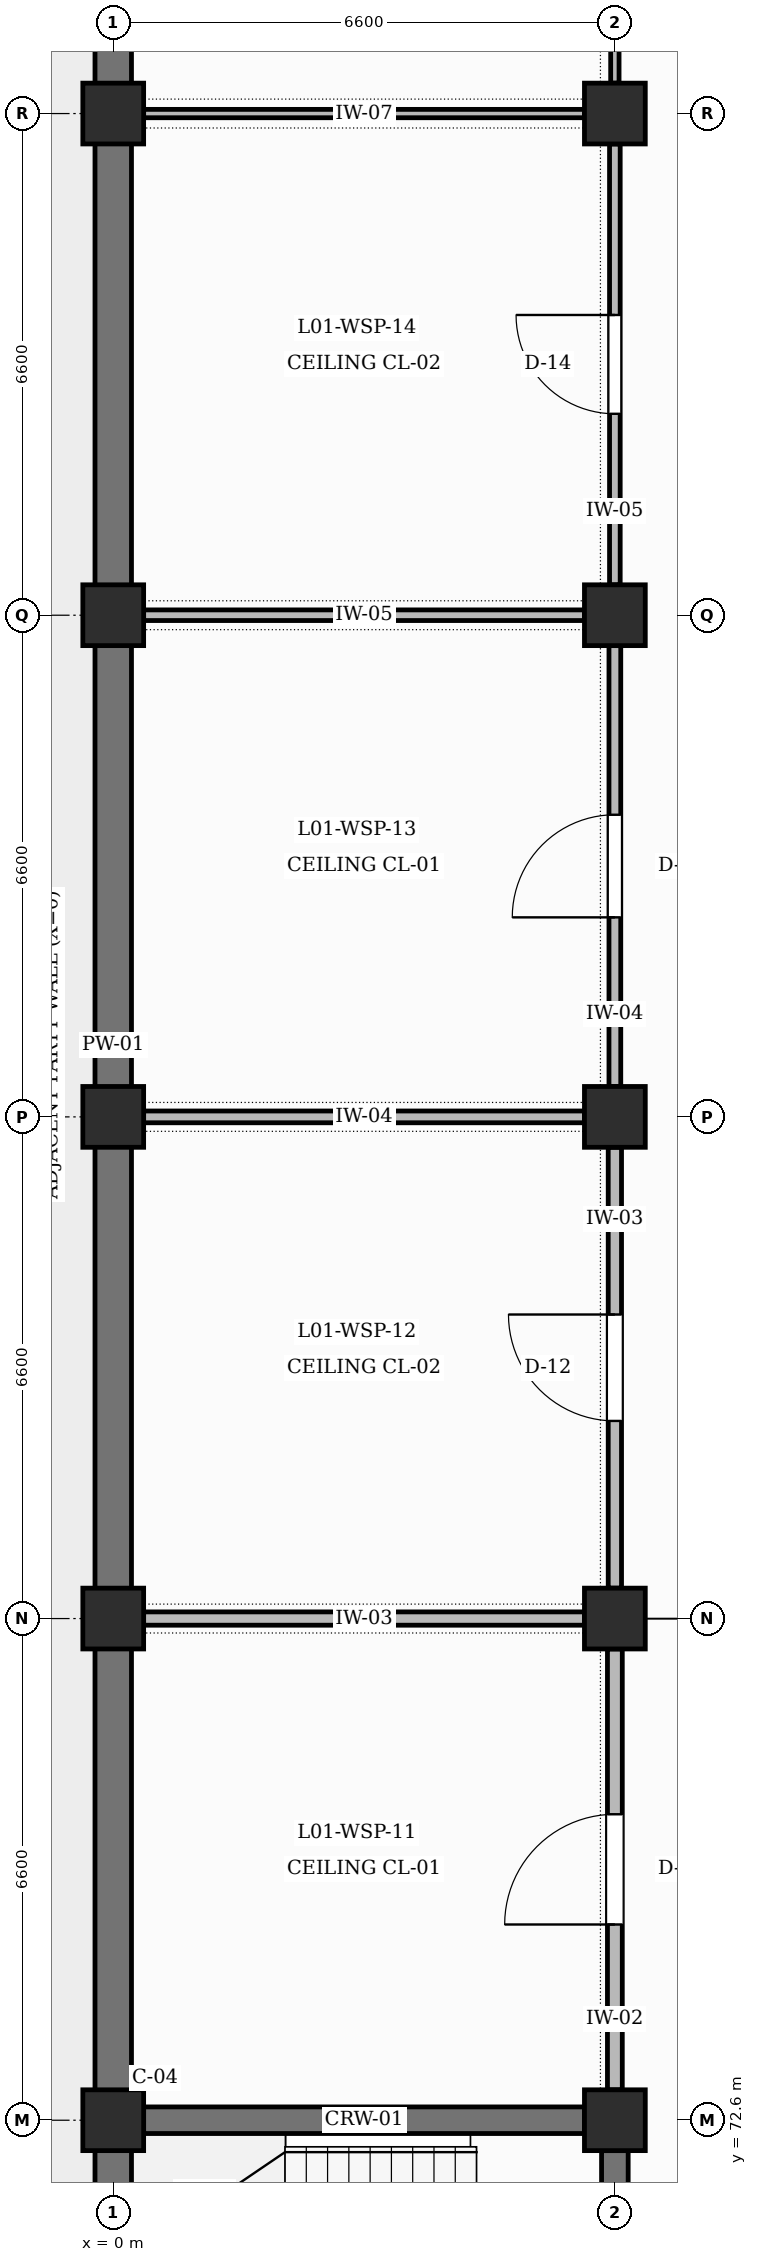
"""IFC4 building model, lengths in metres.
Left out: names, types, materials, properties, quantities, classifications, styles, units other than length and angle.
Written with IfcOpenShell. Run it as: python <this file> out.ifc"""

import sys

from ifc_helpers import new_model, si_unit, direction, frame, frame_2d, origin, origin_2d, place, context, subcontext, project, spatial, rectangle, extrude, element, fill, save


model = new_model("IFC4")
c1 = context("Model", 3, precision=1e-05, world=origin(), true_north=direction((0.0, 1.0)))
c2 = subcontext(c1, "Body", "Model", "MODEL_VIEW")
j1 = project(units=[si_unit("LENGTHUNIT", "METRE"), si_unit("PLANEANGLEUNIT", "RADIAN")], contexts=[c1])
p1 = place(None, origin())
s1 = spatial("IfcSite", under=j1, at=p1, CompositionType="ELEMENT")
p2 = place(p1, origin())
s2 = spatial("IfcBuilding", under=s1, at=p2, CompositionType="ELEMENT")
p3 = place(p2, frame((0.0, 0.0, 5.4)))
s3 = spatial("IfcBuildingStorey", under=s2, at=p3, CompositionType="ELEMENT", Elevation=5.4)
for number, where, z_axis, x_axis in (
    (1, (0.0, 72.6, 0.0), (0.0, 0.0, 1.0), (1.0, 0.0, 0.0)),
    (2, (0.0, 79.2, 0.0), (0.0, 0.0, 1.0), (1.0, 0.0, 0.0)),
    (3, (0.0, 85.8, 0.0), (0.0, 0.0, 1.0), (1.0, 0.0, 0.0)),
    (4, (0.0, 92.4, 0.0), (0.0, 0.0, 1.0), (1.0, 0.0, 0.0)),
    (5, (0.0, 99.0, 0.0), (0.0, 0.0, 1.0), (1.0, 0.0, 0.0)),
    (6, (6.6, 72.6, 0.0), (0.0, 0.0, 1.0), (1.0, 0.0, 0.0)),
    (7, (6.6, 79.2, 0.0), (0.0, 0.0, 1.0), (1.0, 0.0, 0.0)),
    (8, (6.6, 85.8, 0.0), (0.0, 0.0, 1.0), (1.0, 0.0, 0.0)),
    (9, (6.6, 92.4, 0.0), (0.0, 0.0, 1.0), (1.0, 0.0, 0.0)),
    (10, (6.6, 99.0, 0.0), (0.0, 0.0, 1.0), (1.0, 0.0, 0.0)),
):
    element("IfcColumn", number, at=place(p3, frame(where, z_axis=z_axis, x_axis=x_axis)), inside=s3, PredefinedType="COLUMN", context=c2, shape_type="SweptSolid", body=[
        extrude(rectangle(XDim=0.8, YDim=0.8, at=origin_2d()), origin(), (0.0, 0.0, 1.0), 4.8),
    ])
for number, where, z_axis, x_axis in (
    (11, (0.0, 66.4, 0.0), (0.0, 0.0, 1.0), (0.0, 1.0, 0.0)),
    (12, (0.0, 73.0, 0.0), (0.0, 0.0, 1.0), (0.0, 1.0, 0.0)),
):
    element("IfcWall", number, at=place(p3, frame(where, z_axis=z_axis, x_axis=x_axis)), inside=s3, PredefinedType="SOLIDWALL", context=c2, shape_type="SweptSolid", body=[
        extrude(rectangle(XDim=5.8, YDim=0.48, at=frame_2d((2.9, 0.0))), origin(), (0.0, 0.0, 1.0), 3.85),
    ])
p4 = place(p3, frame((0.0, 79.6, 0.0), z_axis=(0.0, 0.0, 1.0), x_axis=(0.0, 1.0, 0.0)))
e13 = element("IfcWall", 13, at=p4, inside=s3, PredefinedType="SOLIDWALL", context=c2, shape_type="SweptSolid", body=[
    extrude(rectangle(XDim=5.8, YDim=0.48, at=frame_2d((2.9, 0.0))), origin(), (0.0, 0.0, 1.0), 3.85),
])
for number, where, z_axis, x_axis in (
    (14, (0.0, 86.2, 0.0), (0.0, 0.0, 1.0), (0.0, 1.0, 0.0)),
    (15, (0.0, 92.8, 0.0), (0.0, 0.0, 1.0), (0.0, 1.0, 0.0)),
    (16, (0.0, 99.4, 0.0), (0.0, 0.0, 1.0), (0.0, 1.0, 0.0)),
):
    element("IfcWall", number, at=place(p3, frame(where, z_axis=z_axis, x_axis=x_axis)), inside=s3, PredefinedType="SOLIDWALL", context=c2, shape_type="SweptSolid", body=[
        extrude(rectangle(XDim=5.8, YDim=0.48, at=frame_2d((2.9, 0.0))), origin(), (0.0, 0.0, 1.0), 3.85),
    ])
p5 = place(p3, frame((0.4, 72.6, 0.0), z_axis=(0.0, 0.0, 1.0), x_axis=(1.0, 0.0, 0.0)))
e17 = element("IfcWall", 17, at=p5, inside=s3, PredefinedType="SHEAR", context=c2, shape_type="SweptSolid", body=[
    extrude(rectangle(XDim=5.8, YDim=0.35, at=frame_2d((2.9, 0.0))), origin(), (0.0, 0.0, 1.0), 3.7),
])
p6 = place(p3, frame((6.6, 66.4, 0.0), z_axis=(0.0, 0.0, 1.0), x_axis=(0.0, 1.0, 0.0)))
e18 = element("IfcWall", 18, at=p6, inside=s3, PredefinedType="SHEAR", context=c2, shape_type="SweptSolid", body=[
    extrude(rectangle(XDim=5.8, YDim=0.35, at=frame_2d((2.9, 0.0))), origin(), (0.0, 0.0, 1.0), 3.7),
])
p7 = place(p6, frame((2.35, 0.0, 0.0)))
e19 = element("IfcOpeningElement", 19, at=p7, cuts=e18, PredefinedType="OPENING", context=c2, shape_type="SweptSolid", body=[
    extrude(rectangle(XDim=1.1, YDim=2.15, at=frame_2d((0.55, 1.075))), frame((0.0, 0.185, 0.0), z_axis=(0.0, -1.0, 0.0), x_axis=(1.0, 0.0, 0.0)), (0.0, 0.0, 1.0), 0.37),
])
p8 = place(p3, frame((6.6, 73.0, 0.0), z_axis=(0.0, 0.0, 1.0), x_axis=(0.0, 1.0, 0.0)))
e20 = element("IfcWall", 20, at=p8, inside=s3, PredefinedType="PARTITIONING", context=c2, shape_type="SweptSolid", body=[
    extrude(rectangle(XDim=5.8, YDim=0.195, at=frame_2d((2.9, 0.0))), origin(), (0.0, 0.0, 1.0), 3.7),
])
p9 = place(p8, frame((2.175, 0.0, 0.0)))
e21 = element("IfcOpeningElement", 21, at=p9, cuts=e20, PredefinedType="OPENING", context=c2, shape_type="SweptSolid", body=[
    extrude(rectangle(XDim=1.45, YDim=2.25, at=frame_2d((0.725, 1.125))), frame((0.0, 0.107, 0.0), z_axis=(0.0, -1.0, 0.0), x_axis=(1.0, 0.0, 0.0)), (0.0, 0.0, 1.0), 0.215),
])
p10 = place(p3, frame((0.4, 79.2, 0.0), z_axis=(0.0, 0.0, 1.0), x_axis=(1.0, 0.0, 0.0)))
e22 = element("IfcWall", 22, at=p10, inside=s3, PredefinedType="PARTITIONING", context=c2, shape_type="SweptSolid", body=[
    extrude(rectangle(XDim=5.8, YDim=0.175, at=frame_2d((2.9, 0.0))), origin(), (0.0, 0.0, 1.0), 3.6),
])
p11 = place(p3, frame((6.6, 79.6, 0.0), z_axis=(0.0, 0.0, 1.0), x_axis=(0.0, 1.0, 0.0)))
e23 = element("IfcWall", 23, at=p11, inside=s3, PredefinedType="PARTITIONING", context=c2, shape_type="SweptSolid", body=[
    extrude(rectangle(XDim=5.8, YDim=0.175, at=frame_2d((2.9, 0.0))), origin(), (0.0, 0.0, 1.0), 3.7),
])
p12 = place(p11, frame((2.2, 0.0, 0.0)))
e24 = element("IfcOpeningElement", 24, at=p12, cuts=e23, PredefinedType="OPENING", context=c2, shape_type="SweptSolid", body=[
    extrude(rectangle(XDim=1.4, YDim=2.25, at=frame_2d((0.7, 1.125))), frame((0.0, 0.097, 0.0), z_axis=(0.0, -1.0, 0.0), x_axis=(1.0, 0.0, 0.0)), (0.0, 0.0, 1.0), 0.195),
])
p13 = place(p3, frame((0.4, 85.8, 0.0), z_axis=(0.0, 0.0, 1.0), x_axis=(1.0, 0.0, 0.0)))
e25 = element("IfcWall", 25, at=p13, inside=s3, PredefinedType="PARTITIONING", context=c2, shape_type="SweptSolid", body=[
    extrude(rectangle(XDim=5.8, YDim=0.155, at=frame_2d((2.9, 0.0))), origin(), (0.0, 0.0, 1.0), 3.7),
])
p14 = place(p3, frame((6.6, 86.2, 0.0), z_axis=(0.0, 0.0, 1.0), x_axis=(0.0, 1.0, 0.0)))
e26 = element("IfcWall", 26, at=p14, inside=s3, PredefinedType="PARTITIONING", context=c2, shape_type="SweptSolid", body=[
    extrude(rectangle(XDim=5.8, YDim=0.155, at=frame_2d((2.9, 0.0))), origin(), (0.0, 0.0, 1.0), 3.7),
])
p15 = place(p14, frame((2.225, 0.0, 0.0)))
e27 = element("IfcOpeningElement", 27, at=p15, cuts=e26, PredefinedType="OPENING", context=c2, shape_type="SweptSolid", body=[
    extrude(rectangle(XDim=1.35, YDim=2.3, at=frame_2d((0.675, 1.15))), frame((0.0, 0.087, 0.0), z_axis=(0.0, -1.0, 0.0), x_axis=(1.0, 0.0, 0.0)), (0.0, 0.0, 1.0), 0.175),
])
p16 = place(p3, frame((0.4, 92.4, 0.0), z_axis=(0.0, 0.0, 1.0), x_axis=(1.0, 0.0, 0.0)))
e28 = element("IfcWall", 28, at=p16, inside=s3, PredefinedType="PARTITIONING", context=c2, shape_type="SweptSolid", body=[
    extrude(rectangle(XDim=5.8, YDim=0.14, at=frame_2d((2.9, 0.0))), origin(), (0.0, 0.0, 1.0), 3.6),
])
p17 = place(p3, frame((6.6, 92.8, 0.0), z_axis=(0.0, 0.0, 1.0), x_axis=(0.0, 1.0, 0.0)))
e29 = element("IfcWall", 29, at=p17, inside=s3, PredefinedType="PARTITIONING", context=c2, shape_type="SweptSolid", body=[
    extrude(rectangle(XDim=5.8, YDim=0.14, at=frame_2d((2.9, 0.0))), origin(), (0.0, 0.0, 1.0), 3.7),
])
p18 = place(p17, frame((2.25, 0.0, 0.0)))
e30 = element("IfcOpeningElement", 30, at=p18, cuts=e29, PredefinedType="OPENING", context=c2, shape_type="SweptSolid", body=[
    extrude(rectangle(XDim=1.3, YDim=2.3, at=frame_2d((0.65, 1.15))), frame((0.0, 0.08, 0.0), z_axis=(0.0, -1.0, 0.0), x_axis=(1.0, 0.0, 0.0)), (0.0, 0.0, 1.0), 0.16),
])
p19 = place(p3, frame((0.4, 99.0, 0.0), z_axis=(0.0, 0.0, 1.0), x_axis=(1.0, 0.0, 0.0)))
e31 = element("IfcWall", 31, at=p19, inside=s3, PredefinedType="PARTITIONING", context=c2, shape_type="SweptSolid", body=[
    extrude(rectangle(XDim=5.8, YDim=0.11, at=frame_2d((2.9, 0.0))), origin(), (0.0, 0.0, 1.0), 3.7),
])
p20 = place(p3, frame((6.6, 99.4, 0.0), z_axis=(0.0, 0.0, 1.0), x_axis=(0.0, 1.0, 0.0)))
e32 = element("IfcWall", 32, at=p20, inside=s3, PredefinedType="PARTITIONING", context=c2, shape_type="SweptSolid", body=[
    extrude(rectangle(XDim=5.8, YDim=0.11, at=frame_2d((2.9, 0.0))), origin(), (0.0, 0.0, 1.0), 3.7),
])
p21 = place(p20, frame((2.275, 0.0, 0.0)))
e33 = element("IfcOpeningElement", 33, at=p21, cuts=e32, PredefinedType="OPENING", context=c2, shape_type="SweptSolid", body=[
    extrude(rectangle(XDim=1.25, YDim=2.25, at=frame_2d((0.625, 1.125))), frame((0.0, 0.065, 0.0), z_axis=(0.0, -1.0, 0.0), x_axis=(1.0, 0.0, 0.0)), (0.0, 0.0, 1.0), 0.13),
])
p22 = place(p9, origin())
e34 = element("IfcDoor", 34, at=p22, inside=s3, OperationType="SINGLE_SWING_LEFT", PredefinedType="DOOR", context=c2, shape_type="SweptSolid", body=[
    extrude(rectangle(XDim=1.45, YDim=2.25, at=frame_2d((0.725, 1.125))), frame((0.0, 0.025, 0.0), z_axis=(0.0, -1.0, 0.0), x_axis=(1.0, 0.0, 0.0)), (0.0, 0.0, 1.0), 0.05),
])
fill(e21, e34)
p23 = place(p12, origin())
e35 = element("IfcDoor", 35, at=p23, inside=s3, OperationType="SINGLE_SWING_RIGHT", PredefinedType="DOOR", context=c2, shape_type="SweptSolid", body=[
    extrude(rectangle(XDim=1.4, YDim=2.25, at=frame_2d((0.7, 1.125))), frame((0.0, 0.025, 0.0), z_axis=(0.0, -1.0, 0.0), x_axis=(1.0, 0.0, 0.0)), (0.0, 0.0, 1.0), 0.05),
])
fill(e24, e35)
p24 = place(p15, origin())
e36 = element("IfcDoor", 36, at=p24, inside=s3, OperationType="SINGLE_SWING_LEFT", PredefinedType="DOOR", context=c2, shape_type="SweptSolid", body=[
    extrude(rectangle(XDim=1.35, YDim=2.3, at=frame_2d((0.675, 1.15))), frame((0.0, 0.025, 0.0), z_axis=(0.0, -1.0, 0.0), x_axis=(1.0, 0.0, 0.0)), (0.0, 0.0, 1.0), 0.05),
])
fill(e27, e36)
p25 = place(p18, origin())
e37 = element("IfcDoor", 37, at=p25, inside=s3, OperationType="SINGLE_SWING_RIGHT", PredefinedType="DOOR", context=c2, shape_type="SweptSolid", body=[
    extrude(rectangle(XDim=1.3, YDim=2.3, at=frame_2d((0.65, 1.15))), frame((0.0, 0.025, 0.0), z_axis=(0.0, -1.0, 0.0), x_axis=(1.0, 0.0, 0.0)), (0.0, 0.0, 1.0), 0.05),
])
fill(e30, e37)
save(model, sys.argv[1])
